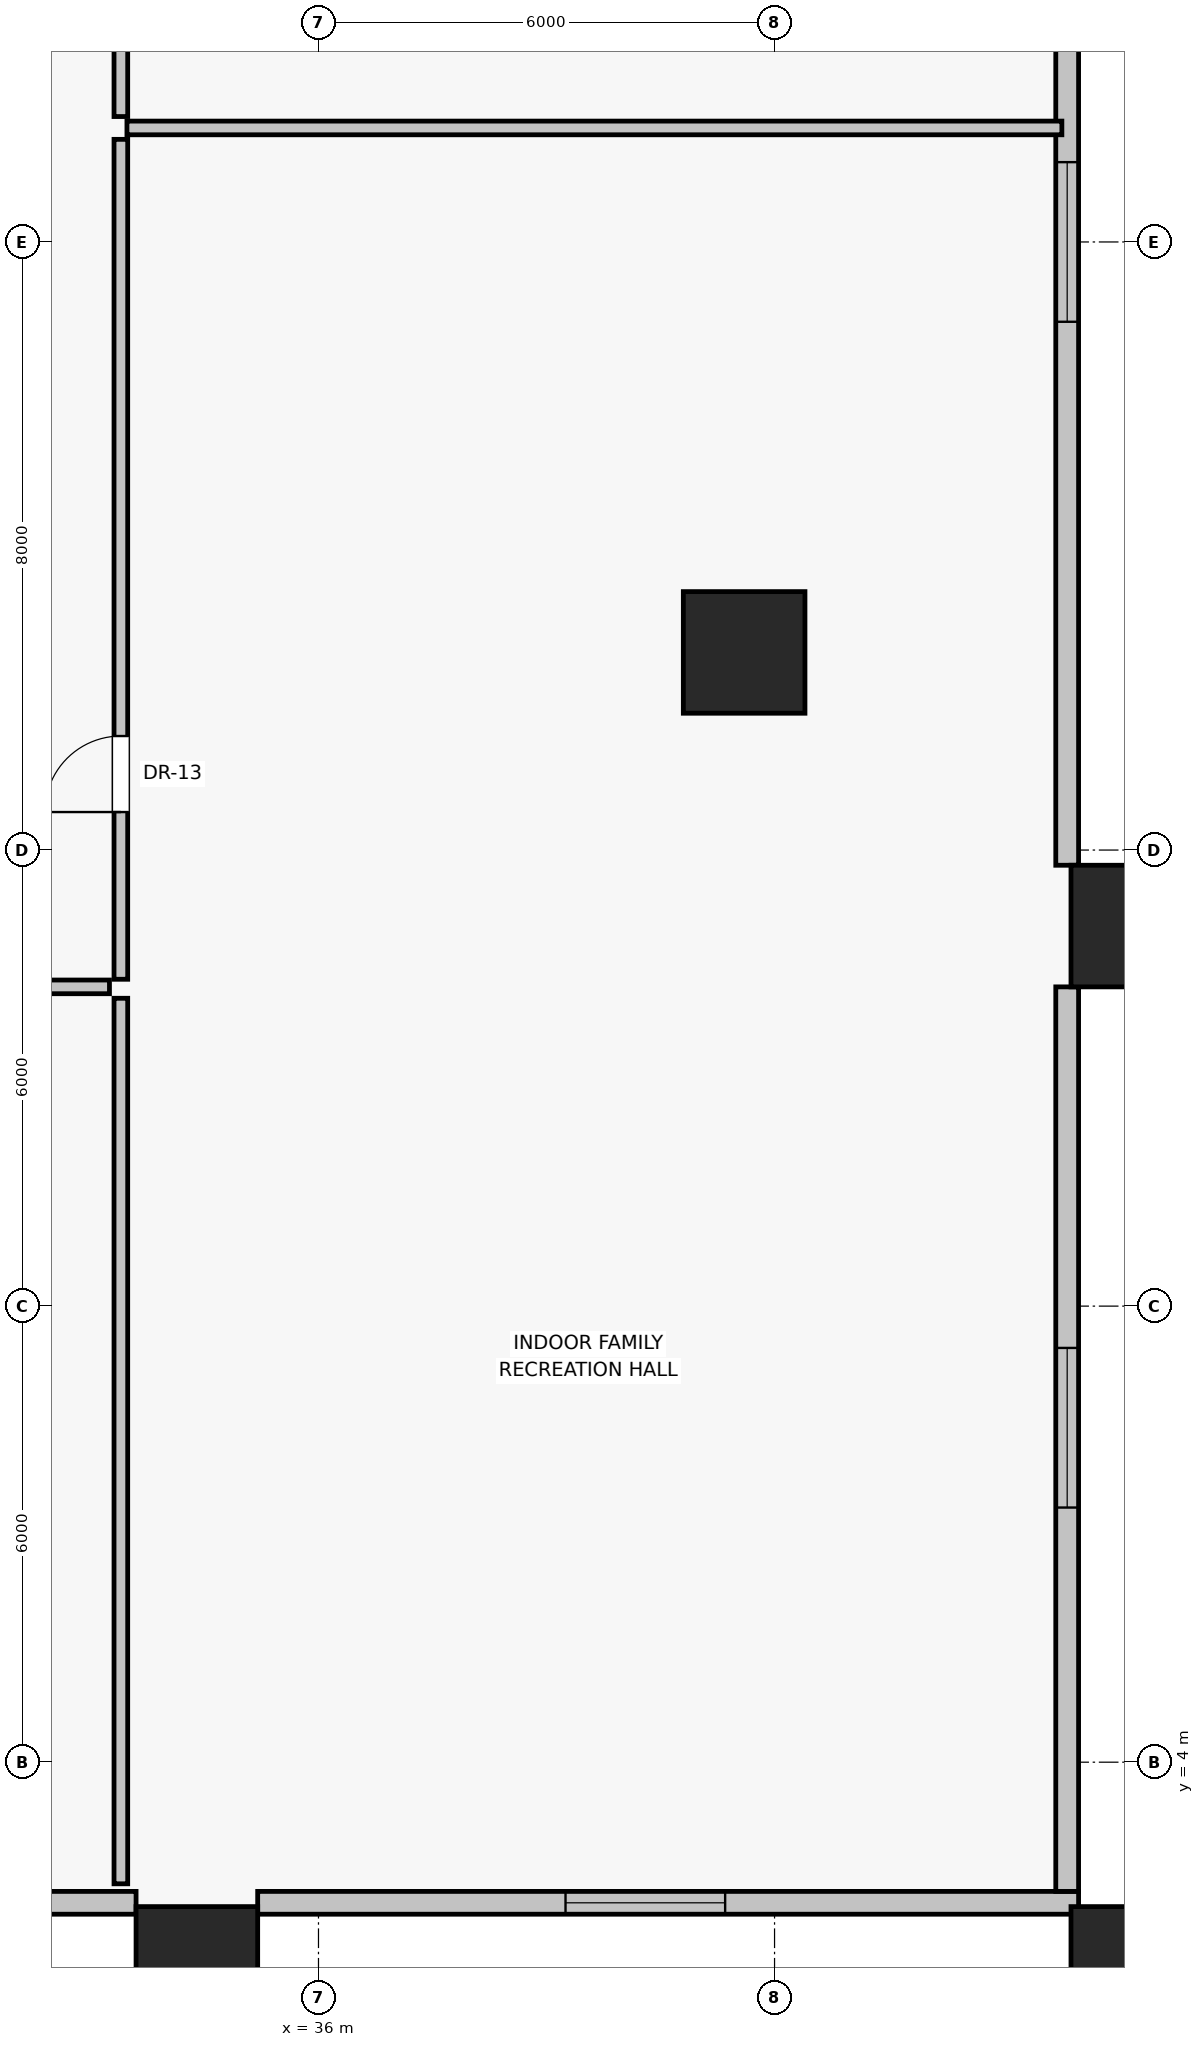
"""IFC4 building model, lengths in metres.
Left out: names, types, materials, properties, quantities, classifications, styles, units other than length and angle.
Written with IfcOpenShell. Run it as: python <this file> out.ifc"""

import sys

from ifc_helpers import new_model, si_unit, direction, frame, frame_2d, origin, origin_2d, place, context, subcontext, project, spatial, rectangle, extrude, source, transform, mapped, element, fill, save


model = new_model("IFC4")
c1 = context("Model", 3, precision=1e-05, world=origin(), true_north=direction((0.0, 1.0)))
c2 = subcontext(c1, "Body", "Model", "MODEL_VIEW")
j1 = project(units=[si_unit("LENGTHUNIT", "METRE"), si_unit("PLANEANGLEUNIT", "RADIAN")], contexts=[c1])
p1 = place(None, origin())
s1 = spatial("IfcSite", under=j1, at=p1, CompositionType="ELEMENT")
p2 = place(p1, origin())
s2 = spatial("IfcBuilding", under=s1, at=p2, CompositionType="ELEMENT")
p3 = place(p2, frame((0.0, 0.0, 18.4)))
s3 = spatial("IfcBuildingStorey", under=s2, at=p3, CompositionType="ELEMENT", Elevation=18.4)
for number, where, z_axis, x_axis in (
    (1, (34.4, 1.3, 0.0), (0.0, 0.0, 1.0), (1.0, 0.0, 0.0)),
    (2, (46.7, 1.3, 0.0), (0.0, 0.0, 1.0), (1.0, 0.0, 0.0)),
    (3, (46.7, 15.0, 0.0), (0.0, 0.0, 1.0), (1.0, 0.0, 0.0)),
    (4, (41.6, 18.6, 0.0), (0.0, 0.0, 1.0), (1.0, 0.0, 0.0)),
):
    element("IfcColumn", number, at=place(p3, frame(where, z_axis=z_axis, x_axis=x_axis)), inside=s3, PredefinedType="COLUMN", context=c2, shape_type="SweptSolid", body=[
        extrude(rectangle(XDim=1.6, YDim=1.6, at=origin_2d()), origin(), (0.0, 0.0, 1.0), 4.4),
    ])
p4 = place(p3, frame((24.8, 2.15, 0.0), z_axis=(0.0, 0.0, 1.0), x_axis=(1.0, 0.0, 0.0)))
e5 = element("IfcWall", 5, at=p4, inside=s3, PredefinedType="SOLIDWALL", context=c2, shape_type="SweptSolid", body=[
    extrude(rectangle(XDim=8.8, YDim=0.3, at=frame_2d((4.4, 0.0))), origin(), (0.0, 0.0, 1.0), 2.95),
])
p5 = place(p4, frame((3.35, 0.0, 0.85)))
e6 = element("IfcOpeningElement", 6, at=p5, cuts=e5, PredefinedType="OPENING", context=c2, shape_type="SweptSolid", body=[
    extrude(rectangle(XDim=2.1, YDim=1.75, at=frame_2d((1.05, 0.875))), frame((0.0, 0.16, 0.0), z_axis=(0.0, -1.0, 0.0), x_axis=(1.0, 0.0, 0.0)), (0.0, 0.0, 1.0), 0.32),
])
p6 = place(p3, frame((35.2, 2.15, 0.0), z_axis=(0.0, 0.0, 1.0), x_axis=(1.0, 0.0, 0.0)))
e7 = element("IfcWall", 7, at=p6, inside=s3, PredefinedType="SOLIDWALL", context=c2, shape_type="SweptSolid", body=[
    extrude(rectangle(XDim=10.8, YDim=0.3, at=frame_2d((5.4, 0.0))), origin(), (0.0, 0.0, 1.0), 2.95),
])
p7 = place(p6, frame((4.05, 0.0, 0.85)))
e8 = element("IfcOpeningElement", 8, at=p7, cuts=e7, PredefinedType="OPENING", context=c2, shape_type="SweptSolid", body=[
    extrude(rectangle(XDim=2.1, YDim=1.75, at=frame_2d((1.05, 0.875))), frame((0.0, 0.16, 0.0), z_axis=(0.0, -1.0, 0.0), x_axis=(1.0, 0.0, 0.0)), (0.0, 0.0, 1.0), 0.32),
])
p8 = place(p3, frame((45.85, 2.3, 0.0), z_axis=(0.0, 0.0, 1.0), x_axis=(0.0, 1.0, 0.0)))
e9 = element("IfcWall", 9, at=p8, inside=s3, PredefinedType="SOLIDWALL", context=c2, shape_type="SweptSolid", body=[
    extrude(rectangle(XDim=11.9, YDim=0.3, at=frame_2d((5.95, 0.0))), origin(), (0.0, 0.0, 1.0), 2.95),
])
p9 = place(p8, frame((5.05, 0.0, 0.85)))
e10 = element("IfcOpeningElement", 10, at=p9, cuts=e9, PredefinedType="OPENING", context=c2, shape_type="SweptSolid", body=[
    extrude(rectangle(XDim=2.1, YDim=1.75, at=frame_2d((1.05, 0.875))), frame((0.0, 0.16, 0.0), z_axis=(0.0, -1.0, 0.0), x_axis=(1.0, 0.0, 0.0)), (0.0, 0.0, 1.0), 0.32),
])
p10 = place(p3, frame((45.85, 15.8, 0.0), z_axis=(0.0, 0.0, 1.0), x_axis=(0.0, 1.0, 0.0)))
e11 = element("IfcWall", 11, at=p10, inside=s3, PredefinedType="SOLIDWALL", context=c2, shape_type="SweptSolid", body=[
    extrude(rectangle(XDim=16.4, YDim=0.3, at=frame_2d((8.2, 0.0))), origin(), (0.0, 0.0, 1.0), 2.95),
])
p11 = place(p10, frame((7.15, 0.0, 0.85)))
e12 = element("IfcOpeningElement", 12, at=p11, cuts=e11, PredefinedType="OPENING", context=c2, shape_type="SweptSolid", body=[
    extrude(rectangle(XDim=2.1, YDim=1.75, at=frame_2d((1.05, 0.875))), frame((0.0, 0.16, 0.0), z_axis=(0.0, -1.0, 0.0), x_axis=(1.0, 0.0, 0.0)), (0.0, 0.0, 1.0), 0.32),
])
p12 = place(p3, frame((26.65, 14.2, 0.0), z_axis=(0.0, 0.0, 1.0), x_axis=(1.0, 0.0, 0.0)))
e13 = element("IfcWall", 13, at=p12, inside=s3, PredefinedType="PARTITIONING", context=c2, shape_type="SweptSolid", body=[
    extrude(rectangle(XDim=6.6, YDim=0.18, at=frame_2d((3.3, 0.0))), origin(), (0.0, 0.0, 1.0), 4.05),
])
p13 = place(p12, frame((2.5, 0.0, 0.0)))
e14 = element("IfcOpeningElement", 14, at=p13, cuts=e13, PredefinedType="OPENING", context=c2, shape_type="SweptSolid", body=[
    extrude(rectangle(XDim=1.0, YDim=2.01, at=frame_2d((0.5, 1.005))), frame((0.0, 0.1, 0.0), z_axis=(0.0, -1.0, 0.0), x_axis=(1.0, 0.0, 0.0)), (0.0, 0.0, 1.0), 0.2),
])
p14 = place(p3, frame((33.4, 2.4, 0.0), z_axis=(0.0, 0.0, 1.0), x_axis=(0.0, 1.0, 0.0)))
e15 = element("IfcWall", 15, at=p14, inside=s3, PredefinedType="PARTITIONING", context=c2, shape_type="SweptSolid", body=[
    extrude(rectangle(XDim=11.65, YDim=0.18, at=frame_2d((5.825, 0.0))), origin(), (0.0, 0.0, 1.0), 4.05),
])
p15 = place(p3, frame((33.4, 14.3, 0.0), z_axis=(0.0, 0.0, 1.0), x_axis=(0.0, 1.0, 0.0)))
e16 = element("IfcWall", 16, at=p15, inside=s3, PredefinedType="PARTITIONING", context=c2, shape_type="SweptSolid", body=[
    extrude(rectangle(XDim=11.05, YDim=0.18, at=frame_2d((5.525, 0.0))), origin(), (0.0, 0.0, 1.0), 4.05),
])
p16 = place(p15, frame((2.2, 0.0, 0.0)))
e17 = element("IfcOpeningElement", 17, at=p16, cuts=e16, PredefinedType="OPENING", context=c2, shape_type="SweptSolid", body=[
    extrude(rectangle(XDim=1.0, YDim=2.01, at=frame_2d((0.5, 1.005))), frame((0.0, 0.1, 0.0), z_axis=(0.0, -1.0, 0.0), x_axis=(1.0, 0.0, 0.0)), (0.0, 0.0, 1.0), 0.2),
])
p17 = place(p3, frame((33.4, 25.65, 0.0), z_axis=(0.0, 0.0, 1.0), x_axis=(0.0, 1.0, 0.0)))
e18 = element("IfcWall", 18, at=p17, inside=s3, PredefinedType="PARTITIONING", context=c2, shape_type="SweptSolid", body=[
    extrude(rectangle(XDim=7.85, YDim=0.18, at=frame_2d((3.925, 0.0))), origin(), (0.0, 0.0, 1.0), 4.05),
])
p18 = place(p17, frame((2.2, 0.0, 0.0)))
e19 = element("IfcOpeningElement", 19, at=p18, cuts=e18, PredefinedType="OPENING", context=c2, shape_type="SweptSolid", body=[
    extrude(rectangle(XDim=1.0, YDim=2.01, at=frame_2d((0.5, 1.005))), frame((0.0, 0.1, 0.0), z_axis=(0.0, -1.0, 0.0), x_axis=(1.0, 0.0, 0.0)), (0.0, 0.0, 1.0), 0.2),
])
p19 = place(p3, frame((33.48, 25.5, 0.0), z_axis=(0.0, 0.0, 1.0), x_axis=(1.0, 0.0, 0.0)))
e20 = element("IfcWall", 20, at=p19, inside=s3, PredefinedType="PARTITIONING", context=c2, shape_type="SweptSolid", body=[
    extrude(rectangle(XDim=12.3, YDim=0.18, at=frame_2d((6.15, 0.0))), origin(), (0.0, 0.0, 1.0), 4.05),
])
m1 = source(origin(), c2, "Body", "SweptSolid", [
    extrude(rectangle(XDim=2.1, YDim=1.75, at=frame_2d((1.05, 0.875))), frame((0.0, 0.03, 0.0), z_axis=(0.0, -1.0, 0.0), x_axis=(1.0, 0.0, 0.0)), (0.0, 0.0, 1.0), 0.06),
])
p20 = place(p7, origin())
e21 = element("IfcWindow", 21, at=p20, inside=s3, PartitioningType="DOUBLE_PANEL_VERTICAL", PredefinedType="WINDOW", context=c2, shape_type="MappedRepresentation", body=[
    mapped(m1, transform((0.0, 0.0, 0.0), scale=1.0)),
])
fill(e8, e21)
p21 = place(p9, origin())
e22 = element("IfcWindow", 22, at=p21, inside=s3, PartitioningType="DOUBLE_PANEL_VERTICAL", PredefinedType="WINDOW", context=c2, shape_type="MappedRepresentation", body=[
    mapped(m1, transform((0.0, 0.0, 0.0), scale=1.0)),
])
fill(e10, e22)
p22 = place(p11, origin())
e23 = element("IfcWindow", 23, at=p22, inside=s3, PartitioningType="DOUBLE_PANEL_VERTICAL", PredefinedType="WINDOW", context=c2, shape_type="MappedRepresentation", body=[
    mapped(m1, transform((0.0, 0.0, 0.0), scale=1.0)),
])
fill(e12, e23)
m2 = source(origin(), c2, "Body", "SweptSolid", [
    extrude(rectangle(XDim=1.0, YDim=2.01, at=frame_2d((0.5, 1.005))), frame((0.0, 0.025, 0.0), z_axis=(0.0, -1.0, 0.0), x_axis=(1.0, 0.0, 0.0)), (0.0, 0.0, 1.0), 0.05),
])
p23 = place(p16, origin())
e24 = element("IfcDoor", 24, at=p23, inside=s3, OperationType="SINGLE_SWING_LEFT", PredefinedType="DOOR", context=c2, shape_type="MappedRepresentation", body=[
    mapped(m2, transform((0.0, 0.0, 0.0), scale=1.0)),
])
fill(e17, e24)
save(model, sys.argv[1])
